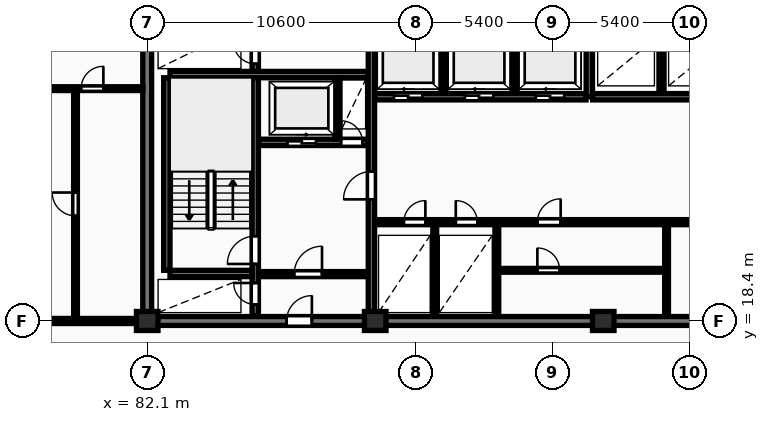
"""IFC4 building model, lengths in metres.
Left out: names, types, materials, properties, quantities, classifications, styles, units other than length and angle.
Written with IfcOpenShell. Run it as: python <this file> out.ifc"""

import sys

from ifc_helpers import new_model, si_unit, direction, frame, frame_2d, origin, origin_2d, place, context, subcontext, project, spatial, rectangle, extrude, element, fill, save


model = new_model("IFC4")
c1 = context("Model", 3, precision=1e-05, world=origin(), true_north=direction((0.0, 1.0)))
c2 = subcontext(c1, "Body", "Model", "MODEL_VIEW")
j1 = project(units=[si_unit("LENGTHUNIT", "METRE"), si_unit("PLANEANGLEUNIT", "RADIAN")], contexts=[c1])
p1 = place(None, origin())
s1 = spatial("IfcSite", under=j1, at=p1, CompositionType="ELEMENT")
p2 = place(p1, origin())
s2 = spatial("IfcBuilding", under=s1, at=p2, CompositionType="ELEMENT")
p3 = place(p2, frame((0.0, 0.0, 80.8)))
s3 = spatial("IfcBuildingStorey", under=s2, at=p3, CompositionType="ELEMENT", Elevation=80.8)
for number, where, z_axis, x_axis in (
    (1, (82.1, 18.4, 0.0), (0.0, 0.0, 1.0), (1.0, 0.0, 0.0)),
    (2, (91.1, 18.4, 0.0), (0.0, 0.0, 1.0), (1.0, 0.0, 0.0)),
    (3, (100.1, 18.4, 0.0), (0.0, 0.0, 1.0), (1.0, 0.0, 0.0)),
):
    element("IfcColumn", number, at=place(p3, frame(where, z_axis=z_axis, x_axis=x_axis)), inside=s3, PredefinedType="COLUMN", context=c2, shape_type="SweptSolid", body=[
        extrude(rectangle(XDim=0.85, YDim=0.75, at=origin_2d()), origin(), (0.0, 0.0, 1.0), 3.25),
    ])
p4 = place(p3, frame((82.1, 18.575, 0.0), z_axis=(0.0, 0.0, 1.0), x_axis=(0.0, 1.0, 0.0)))
e4 = element("IfcWall", 4, at=p4, inside=s3, PredefinedType="SHEAR", context=c2, shape_type="SweptSolid", body=[
    extrude(rectangle(XDim=11.65, YDim=0.35, at=frame_2d((5.825, 0.0))), origin(), (0.0, 0.0, 1.0), 3.25),
])
p5 = place(p3, frame((81.925, 18.4, 0.0), z_axis=(0.0, 0.0, 1.0), x_axis=(1.0, 0.0, 0.0)))
e5 = element("IfcWall", 5, at=p5, inside=s3, PredefinedType="SHEAR", context=c2, shape_type="SweptSolid", body=[
    extrude(rectangle(XDim=36.265, YDim=0.35, at=frame_2d((18.132, 0.0))), origin(), (0.0, 0.0, 1.0), 3.25),
])
p6 = place(p5, frame((5.675, 0.0, 0.0)))
e6 = element("IfcOpeningElement", 6, at=p6, cuts=e5, PredefinedType="OPENING", context=c2, shape_type="SweptSolid", body=[
    extrude(rectangle(XDim=1.0, YDim=2.15, at=frame_2d((0.5, 1.075))), frame((0.0, 0.185, 0.0), z_axis=(0.0, -1.0, 0.0), x_axis=(1.0, 0.0, 0.0)), (0.0, 0.0, 1.0), 0.37),
])
p7 = place(p5, frame((21.925, 0.0, 0.0)))
e7 = element("IfcOpeningElement", 7, at=p7, cuts=e5, PredefinedType="OPENING", context=c2, shape_type="SweptSolid", body=[
    extrude(rectangle(XDim=1.5, YDim=2.2, at=frame_2d((0.75, 1.1))), frame((0.0, 0.185, 0.0), z_axis=(0.0, -1.0, 0.0), x_axis=(1.0, 0.0, 0.0)), (0.0, 0.0, 1.0), 0.37),
])
p8 = place(p5, frame((29.875, 0.0, 0.0)))
e8 = element("IfcOpeningElement", 8, at=p8, cuts=e5, PredefinedType="OPENING", context=c2, shape_type="SweptSolid", body=[
    extrude(rectangle(XDim=1.0, YDim=2.15, at=frame_2d((0.5, 1.075))), frame((0.0, 0.185, 0.0), z_axis=(0.0, -1.0, 0.0), x_axis=(1.0, 0.0, 0.0)), (0.0, 0.0, 1.0), 0.37),
])
p9 = place(p3, frame((82.875, 20.4, 0.0), z_axis=(0.0, 0.0, 1.0), x_axis=(0.0, 1.0, 0.0)))
e9 = element("IfcWall", 9, at=p9, inside=s3, PredefinedType="SHEAR", context=c2, shape_type="SweptSolid", body=[
    extrude(rectangle(XDim=7.6, YDim=0.25, at=frame_2d((3.8, 0.0))), origin(), (0.0, 0.0, 1.0), 3.25),
])
p10 = place(p3, frame((86.365, 18.6, 0.0), z_axis=(0.0, 0.0, 1.0), x_axis=(0.0, 1.0, 0.0)))
e10 = element("IfcWall", 10, at=p10, inside=s3, PredefinedType="SHEAR", context=c2, shape_type="SweptSolid", body=[
    extrude(rectangle(XDim=11.6, YDim=0.25, at=frame_2d((5.8, 0.0))), origin(), (0.0, 0.0, 1.0), 3.25),
])
p11 = place(p10, frame((0.45, 0.0, 0.0)))
e11 = element("IfcOpeningElement", 11, at=p11, cuts=e10, PredefinedType="OPENING", context=c2, shape_type="SweptSolid", body=[
    extrude(rectangle(XDim=0.85, YDim=2.05, at=frame_2d((0.425, 1.025))), frame((0.0, 0.135, 0.0), z_axis=(0.0, -1.0, 0.0), x_axis=(1.0, 0.0, 0.0)), (0.0, 0.0, 1.0), 0.27),
])
p12 = place(p10, frame((2.05, 0.0, 0.0)))
e12 = element("IfcOpeningElement", 12, at=p12, cuts=e10, PredefinedType="OPENING", context=c2, shape_type="SweptSolid", body=[
    extrude(rectangle(XDim=1.1, YDim=2.1, at=frame_2d((0.55, 1.05))), frame((0.0, 0.135, 0.0), z_axis=(0.0, -1.0, 0.0), x_axis=(1.0, 0.0, 0.0)), (0.0, 0.0, 1.0), 0.27),
])
p13 = place(p10, frame((9.95, 0.0, 0.0)))
e13 = element("IfcOpeningElement", 13, at=p13, cuts=e10, PredefinedType="OPENING", context=c2, shape_type="SweptSolid", body=[
    extrude(rectangle(XDim=0.85, YDim=2.05, at=frame_2d((0.425, 1.025))), frame((0.0, 0.135, 0.0), z_axis=(0.0, -1.0, 0.0), x_axis=(1.0, 0.0, 0.0)), (0.0, 0.0, 1.0), 0.27),
])
p14 = place(p3, frame((83.0, 20.275, 0.0), z_axis=(0.0, 0.0, 1.0), x_axis=(1.0, 0.0, 0.0)))
e14 = element("IfcWall", 14, at=p14, inside=s3, PredefinedType="SHEAR", context=c2, shape_type="SweptSolid", body=[
    extrude(rectangle(XDim=3.24, YDim=0.25, at=frame_2d((1.62, 0.0))), origin(), (0.0, 0.0, 1.0), 3.25),
])
p15 = place(p3, frame((83.0, 28.125, 0.0), z_axis=(0.0, 0.0, 1.0), x_axis=(1.0, 0.0, 0.0)))
e15 = element("IfcWall", 15, at=p15, inside=s3, PredefinedType="SHEAR", context=c2, shape_type="SweptSolid", body=[
    extrude(rectangle(XDim=7.82, YDim=0.25, at=frame_2d((3.91, 0.0))), origin(), (0.0, 0.0, 1.0), 3.25),
])
p16 = place(p3, frame((86.5, 25.45, 0.0), z_axis=(0.0, 0.0, 1.0), x_axis=(1.0, 0.0, 0.0)))
e16 = element("IfcWall", 16, at=p16, inside=s3, PredefinedType="SHEAR", context=c2, shape_type="SweptSolid", body=[
    extrude(rectangle(XDim=4.32, YDim=0.25, at=frame_2d((2.16, 0.0))), origin(), (0.0, 0.0, 1.0), 3.25),
])
p17 = place(p16, frame((1.14, 0.0, 0.0)))
e17 = element("IfcOpeningElement", 17, at=p17, cuts=e16, PredefinedType="OPENING", context=c2, shape_type="SweptSolid", body=[
    extrude(rectangle(XDim=1.12, YDim=2.12, at=frame_2d((0.56, 1.06))), frame((0.0, 0.135, 0.0), z_axis=(0.0, -1.0, 0.0), x_axis=(1.0, 0.0, 0.0)), (0.0, 0.0, 1.0), 0.27),
])
p18 = place(p16, frame((3.25, 0.0, 0.0)))
e18 = element("IfcOpeningElement", 18, at=p18, cuts=e16, PredefinedType="OPENING", context=c2, shape_type="SweptSolid", body=[
    extrude(rectangle(XDim=0.85, YDim=2.05, at=frame_2d((0.425, 1.025))), frame((0.0, 0.135, 0.0), z_axis=(0.0, -1.0, 0.0), x_axis=(1.0, 0.0, 0.0)), (0.0, 0.0, 1.0), 0.27),
])
p19 = place(p3, frame((89.6, 25.58, 0.0), z_axis=(0.0, 0.0, 1.0), x_axis=(0.0, 1.0, 0.0)))
e19 = element("IfcWall", 19, at=p19, inside=s3, PredefinedType="PARTITIONING", context=c2, shape_type="SweptSolid", body=[
    extrude(rectangle(XDim=2.42, YDim=0.2, at=frame_2d((1.21, 0.0))), origin(), (0.0, 0.0, 1.0), 2.97),
])
p20 = place(p3, frame((86.5, 20.25, 0.0), z_axis=(0.0, 0.0, 1.0), x_axis=(1.0, 0.0, 0.0)))
e20 = element("IfcWall", 20, at=p20, inside=s3, PredefinedType="PARTITIONING", context=c2, shape_type="SweptSolid", body=[
    extrude(rectangle(XDim=4.32, YDim=0.2, at=frame_2d((2.16, 0.0))), origin(), (0.0, 0.0, 1.0), 2.97),
])
p21 = place(p20, frame((1.4, 0.0, 0.0)))
e21 = element("IfcOpeningElement", 21, at=p21, cuts=e20, PredefinedType="OPENING", context=c2, shape_type="SweptSolid", body=[
    extrude(rectangle(XDim=1.1, YDim=2.1, at=frame_2d((0.55, 1.05))), frame((0.0, 0.11, 0.0), z_axis=(0.0, -1.0, 0.0), x_axis=(1.0, 0.0, 0.0)), (0.0, 0.0, 1.0), 0.22),
])
p22 = place(p3, frame((90.95, 18.6, 0.0), z_axis=(0.0, 0.0, 1.0), x_axis=(0.0, 1.0, 0.0)))
e22 = element("IfcWall", 22, at=p22, inside=s3, PredefinedType="SHEAR", context=c2, shape_type="SweptSolid", body=[
    extrude(rectangle(XDim=11.6, YDim=0.25, at=frame_2d((5.8, 0.0))), origin(), (0.0, 0.0, 1.0), 3.25),
])
p23 = place(p22, frame((4.6, 0.0, 0.0)))
e23 = element("IfcOpeningElement", 23, at=p23, cuts=e22, PredefinedType="OPENING", context=c2, shape_type="SweptSolid", body=[
    extrude(rectangle(XDim=1.1, YDim=2.1, at=frame_2d((0.55, 1.05))), frame((0.0, 0.135, 0.0), z_axis=(0.0, -1.0, 0.0), x_axis=(1.0, 0.0, 0.0)), (0.0, 0.0, 1.0), 0.27),
])
for number, where, z_axis, x_axis in (
    (24, (93.8, 27.38, 0.0), (0.0, 0.0, 1.0), (0.0, 1.0, 0.0)),
    (25, (96.6, 27.38, 0.0), (0.0, 0.0, 1.0), (0.0, 1.0, 0.0)),
):
    element("IfcWall", number, at=place(p3, frame(where, z_axis=z_axis, x_axis=x_axis)), inside=s3, PredefinedType="PARTITIONING", context=c2, shape_type="SweptSolid", body=[
        extrude(rectangle(XDim=2.82, YDim=0.2, at=frame_2d((1.41, 0.0))), origin(), (0.0, 0.0, 1.0), 2.97),
    ])
p24 = place(p3, frame((91.08, 27.25, 0.0), z_axis=(0.0, 0.0, 1.0), x_axis=(1.0, 0.0, 0.0)))
e26 = element("IfcWall", 26, at=p24, inside=s3, PredefinedType="SHEAR", context=c2, shape_type="SweptSolid", body=[
    extrude(rectangle(XDim=8.34, YDim=0.25, at=frame_2d((4.17, 0.0))), origin(), (0.0, 0.0, 1.0), 3.25),
])
p25 = place(p24, frame((0.76, 0.0, 0.0)))
e27 = element("IfcOpeningElement", 27, at=p25, cuts=e26, PredefinedType="OPENING", context=c2, shape_type="SweptSolid", body=[
    extrude(rectangle(XDim=1.12, YDim=2.12, at=frame_2d((0.56, 1.06))), frame((0.0, 0.135, 0.0), z_axis=(0.0, -1.0, 0.0), x_axis=(1.0, 0.0, 0.0)), (0.0, 0.0, 1.0), 0.27),
])
p26 = place(p24, frame((3.56, 0.0, 0.0)))
e28 = element("IfcOpeningElement", 28, at=p26, cuts=e26, PredefinedType="OPENING", context=c2, shape_type="SweptSolid", body=[
    extrude(rectangle(XDim=1.12, YDim=2.12, at=frame_2d((0.56, 1.06))), frame((0.0, 0.135, 0.0), z_axis=(0.0, -1.0, 0.0), x_axis=(1.0, 0.0, 0.0)), (0.0, 0.0, 1.0), 0.27),
])
p27 = place(p24, frame((6.36, 0.0, 0.0)))
e29 = element("IfcOpeningElement", 29, at=p27, cuts=e26, PredefinedType="OPENING", context=c2, shape_type="SweptSolid", body=[
    extrude(rectangle(XDim=1.12, YDim=2.12, at=frame_2d((0.56, 1.06))), frame((0.0, 0.135, 0.0), z_axis=(0.0, -1.0, 0.0), x_axis=(1.0, 0.0, 0.0)), (0.0, 0.0, 1.0), 0.27),
])
p28 = place(p3, frame((99.55, 27.25, 0.0), z_axis=(0.0, 0.0, 1.0), x_axis=(0.0, 1.0, 0.0)))
e30 = element("IfcWall", 30, at=p28, inside=s3, PredefinedType="SHEAR", context=c2, shape_type="SweptSolid", body=[
    extrude(rectangle(XDim=2.95, YDim=0.25, at=frame_2d((1.475, 0.0))), origin(), (0.0, 0.0, 1.0), 3.25),
])
p29 = place(p3, frame((102.4, 27.38, 0.0), z_axis=(0.0, 0.0, 1.0), x_axis=(0.0, 1.0, 0.0)))
e31 = element("IfcWall", 31, at=p29, inside=s3, PredefinedType="PARTITIONING", context=c2, shape_type="SweptSolid", body=[
    extrude(rectangle(XDim=2.82, YDim=0.2, at=frame_2d((1.41, 0.0))), origin(), (0.0, 0.0, 1.0), 2.97),
])
p30 = place(p3, frame((99.68, 27.25, 0.0), z_axis=(0.0, 0.0, 1.0), x_axis=(1.0, 0.0, 0.0)))
e32 = element("IfcWall", 32, at=p30, inside=s3, PredefinedType="SHEAR", context=c2, shape_type="SweptSolid", body=[
    extrude(rectangle(XDim=10.54, YDim=0.25, at=frame_2d((5.27, 0.0))), origin(), (0.0, 0.0, 1.0), 3.25),
])
p31 = place(p30, frame((8.92, 0.0, 0.0)))
e33 = element("IfcOpeningElement", 33, at=p31, cuts=e32, PredefinedType="OPENING", context=c2, shape_type="SweptSolid", body=[
    extrude(rectangle(XDim=0.85, YDim=2.05, at=frame_2d((0.425, 1.025))), frame((0.0, 0.135, 0.0), z_axis=(0.0, -1.0, 0.0), x_axis=(1.0, 0.0, 0.0)), (0.0, 0.0, 1.0), 0.27),
])
for number, where, z_axis, x_axis in (
    (34, (93.45, 18.6, 0.0), (0.0, 0.0, 1.0), (0.0, 1.0, 0.0)),
    (35, (95.9, 18.6, 0.0), (0.0, 0.0, 1.0), (0.0, 1.0, 0.0)),
):
    element("IfcWall", number, at=place(p3, frame(where, z_axis=z_axis, x_axis=x_axis)), inside=s3, PredefinedType="PARTITIONING", context=c2, shape_type="SweptSolid", body=[
        extrude(rectangle(XDim=3.6, YDim=0.15, at=frame_2d((1.8, 0.0))), origin(), (0.0, 0.0, 1.0), 2.97),
    ])
p32 = place(p3, frame((95.9, 20.4, 0.0), z_axis=(0.0, 0.0, 1.0), x_axis=(1.0, 0.0, 0.0)))
e36 = element("IfcWall", 36, at=p32, inside=s3, PredefinedType="PARTITIONING", context=c2, shape_type="SweptSolid", body=[
    extrude(rectangle(XDim=6.7, YDim=0.15, at=frame_2d((3.35, 0.0))), origin(), (0.0, 0.0, 1.0), 2.97),
])
p33 = place(p32, frame((1.6, 0.0, 0.0)))
e37 = element("IfcOpeningElement", 37, at=p33, cuts=e36, PredefinedType="OPENING", context=c2, shape_type="SweptSolid", body=[
    extrude(rectangle(XDim=0.88, YDim=2.06, at=frame_2d((0.44, 1.03))), frame((0.0, 0.085, 0.0), z_axis=(0.0, -1.0, 0.0), x_axis=(1.0, 0.0, 0.0)), (0.0, 0.0, 1.0), 0.17),
])
p34 = place(p3, frame((102.6, 18.6, 0.0), z_axis=(0.0, 0.0, 1.0), x_axis=(0.0, 1.0, 0.0)))
e38 = element("IfcWall", 38, at=p34, inside=s3, PredefinedType="PARTITIONING", context=c2, shape_type="SweptSolid", body=[
    extrude(rectangle(XDim=3.6, YDim=0.15, at=frame_2d((1.8, 0.0))), origin(), (0.0, 0.0, 1.0), 2.97),
])
p35 = place(p3, frame((91.08, 22.3, 0.0), z_axis=(0.0, 0.0, 1.0), x_axis=(1.0, 0.0, 0.0)))
e39 = element("IfcWall", 39, at=p35, inside=s3, PredefinedType="PARTITIONING", context=c2, shape_type="SweptSolid", body=[
    extrude(rectangle(XDim=19.14, YDim=0.2, at=frame_2d((9.57, 0.0))), origin(), (0.0, 0.0, 1.0), 2.97),
])
p36 = place(p35, frame((1.15, 0.0, 0.0)))
e40 = element("IfcOpeningElement", 40, at=p36, cuts=e39, PredefinedType="OPENING", context=c2, shape_type="SweptSolid", body=[
    extrude(rectangle(XDim=0.85, YDim=2.05, at=frame_2d((0.425, 1.025))), frame((0.0, 0.11, 0.0), z_axis=(0.0, -1.0, 0.0), x_axis=(1.0, 0.0, 0.0)), (0.0, 0.0, 1.0), 0.22),
])
p37 = place(p35, frame((3.2, 0.0, 0.0)))
e41 = element("IfcOpeningElement", 41, at=p37, cuts=e39, PredefinedType="OPENING", context=c2, shape_type="SweptSolid", body=[
    extrude(rectangle(XDim=0.85, YDim=2.05, at=frame_2d((0.425, 1.025))), frame((0.0, 0.11, 0.0), z_axis=(0.0, -1.0, 0.0), x_axis=(1.0, 0.0, 0.0)), (0.0, 0.0, 1.0), 0.22),
])
p38 = place(p35, frame((12.72, 0.0, 0.0)))
e42 = element("IfcOpeningElement", 42, at=p38, cuts=e39, PredefinedType="OPENING", context=c2, shape_type="SweptSolid", body=[
    extrude(rectangle(XDim=1.5, YDim=2.2, at=frame_2d((0.75, 1.1))), frame((0.0, 0.11, 0.0), z_axis=(0.0, -1.0, 0.0), x_axis=(1.0, 0.0, 0.0)), (0.0, 0.0, 1.0), 0.22),
])
p39 = place(p35, frame((6.42, 0.0, 0.0)))
e43 = element("IfcOpeningElement", 43, at=p39, cuts=e39, PredefinedType="OPENING", context=c2, shape_type="SweptSolid", body=[
    extrude(rectangle(XDim=0.92, YDim=2.08, at=frame_2d((0.46, 1.04))), frame((0.0, 0.11, 0.0), z_axis=(0.0, -1.0, 0.0), x_axis=(1.0, 0.0, 0.0)), (0.0, 0.0, 1.0), 0.22),
])
p40 = place(p35, frame((15.92, 0.0, 0.0)))
e44 = element("IfcOpeningElement", 44, at=p40, cuts=e39, PredefinedType="OPENING", context=c2, shape_type="SweptSolid", body=[
    extrude(rectangle(XDim=0.88, YDim=2.06, at=frame_2d((0.44, 1.03))), frame((0.0, 0.11, 0.0), z_axis=(0.0, -1.0, 0.0), x_axis=(1.0, 0.0, 0.0)), (0.0, 0.0, 1.0), 0.22),
])
p41 = place(p3, frame((79.27, 18.45, 0.0), z_axis=(0.0, 0.0, 1.0), x_axis=(0.0, 1.0, 0.0)))
e45 = element("IfcWall", 45, at=p41, inside=s3, PredefinedType="PARTITIONING", context=c2, shape_type="SweptSolid", body=[
    extrude(rectangle(XDim=9.12, YDim=0.15, at=frame_2d((4.56, 0.0))), origin(), (0.0, 0.0, 1.0), 2.97),
])
p42 = place(p41, frame((4.1, 0.0, 0.0)))
e46 = element("IfcOpeningElement", 46, at=p42, cuts=e45, PredefinedType="OPENING", context=c2, shape_type="SweptSolid", body=[
    extrude(rectangle(XDim=0.92, YDim=2.08, at=frame_2d((0.46, 1.04))), frame((0.0, 0.085, 0.0), z_axis=(0.0, -1.0, 0.0), x_axis=(1.0, 0.0, 0.0)), (0.0, 0.0, 1.0), 0.17),
])
p43 = place(p3, frame((75.17, 27.57, 0.0), z_axis=(0.0, 0.0, 1.0), x_axis=(1.0, 0.0, 0.0)))
e47 = element("IfcWall", 47, at=p43, inside=s3, PredefinedType="PARTITIONING", context=c2, shape_type="SweptSolid", body=[
    extrude(rectangle(XDim=6.76, YDim=0.15, at=frame_2d((3.38, 0.0))), origin(), (0.0, 0.0, 1.0), 2.97),
])
p44 = place(p43, frame((1.266, 0.0, 0.0)))
e48 = element("IfcOpeningElement", 48, at=p44, cuts=e47, PredefinedType="OPENING", context=c2, shape_type="SweptSolid", body=[
    extrude(rectangle(XDim=0.84, YDim=2.04, at=frame_2d((0.42, 1.02))), frame((0.0, 0.085, 0.0), z_axis=(0.0, -1.0, 0.0), x_axis=(1.0, 0.0, 0.0)), (0.0, 0.0, 1.0), 0.17),
])
p45 = place(p43, frame((4.32, 0.0, 0.0)))
e49 = element("IfcOpeningElement", 49, at=p45, cuts=e47, PredefinedType="OPENING", context=c2, shape_type="SweptSolid", body=[
    extrude(rectangle(XDim=0.88, YDim=2.06, at=frame_2d((0.44, 1.03))), frame((0.0, 0.085, 0.0), z_axis=(0.0, -1.0, 0.0), x_axis=(1.0, 0.0, 0.0)), (0.0, 0.0, 1.0), 0.17),
])
p46 = place(p3, frame((72.7, 18.4, 0.0), z_axis=(0.0, 0.0, 1.0), x_axis=(1.0, 0.0, 0.0)))
e50 = element("IfcWall", 50, at=p46, inside=s3, PredefinedType="PARTITIONING", context=c2, shape_type="SweptSolid", body=[
    extrude(rectangle(XDim=9.25, YDim=0.2, at=frame_2d((4.625, 0.0))), origin(), (0.0, 0.0, 1.0), 2.358),
])
p47 = place(p46, frame((4.15, 0.0, 0.0)))
e51 = element("IfcOpeningElement", 51, at=p47, cuts=e50, PredefinedType="OPENING", context=c2, shape_type="SweptSolid", body=[
    extrude(rectangle(XDim=0.95, YDim=2.15, at=frame_2d((0.475, 1.075))), frame((0.0, 0.11, 0.0), z_axis=(0.0, -1.0, 0.0), x_axis=(1.0, 0.0, 0.0)), (0.0, 0.0, 1.0), 0.22),
])
p48 = place(p6, origin())
e52 = element("IfcDoor", 52, at=p48, inside=s3, OperationType="SINGLE_SWING_RIGHT", PredefinedType="DOOR", context=c2, shape_type="SweptSolid", body=[
    extrude(rectangle(XDim=1.0, YDim=2.15, at=frame_2d((0.5, 1.075))), frame((0.0, 0.025, 0.0), z_axis=(0.0, -1.0, 0.0), x_axis=(1.0, 0.0, 0.0)), (0.0, 0.0, 1.0), 0.05),
])
fill(e6, e52)
p49 = place(p11, origin())
e53 = element("IfcDoor", 53, at=p49, inside=s3, OperationType="SINGLE_SWING_RIGHT", PredefinedType="DOOR", context=c2, shape_type="SweptSolid", body=[
    extrude(rectangle(XDim=0.85, YDim=2.05, at=frame_2d((0.425, 1.025))), frame((0.0, 0.025, 0.0), z_axis=(0.0, -1.0, 0.0), x_axis=(1.0, 0.0, 0.0)), (0.0, 0.0, 1.0), 0.05),
])
fill(e11, e53)
p50 = place(p12, origin())
e54 = element("IfcDoor", 54, at=p50, inside=s3, OperationType="SINGLE_SWING_LEFT", PredefinedType="DOOR", context=c2, shape_type="SweptSolid", body=[
    extrude(rectangle(XDim=1.1, YDim=2.1, at=frame_2d((0.55, 1.05))), frame((0.0, 0.025, 0.0), z_axis=(0.0, -1.0, 0.0), x_axis=(1.0, 0.0, 0.0)), (0.0, 0.0, 1.0), 0.05),
])
fill(e12, e54)
p51 = place(p13, origin())
e55 = element("IfcDoor", 55, at=p51, inside=s3, OperationType="SINGLE_SWING_RIGHT", PredefinedType="DOOR", context=c2, shape_type="SweptSolid", body=[
    extrude(rectangle(XDim=0.85, YDim=2.05, at=frame_2d((0.425, 1.025))), frame((0.0, 0.025, 0.0), z_axis=(0.0, -1.0, 0.0), x_axis=(1.0, 0.0, 0.0)), (0.0, 0.0, 1.0), 0.05),
])
fill(e13, e55)
p52 = place(p17, origin())
e56 = element("IfcDoor", 56, at=p52, inside=s3, OperationType="SLIDING_TO_RIGHT", PredefinedType="DOOR", context=c2, shape_type="SweptSolid", body=[
    extrude(rectangle(XDim=1.12, YDim=2.12, at=frame_2d((0.56, 1.06))), frame((0.0, 0.025, 0.0), z_axis=(0.0, -1.0, 0.0), x_axis=(1.0, 0.0, 0.0)), (0.0, 0.0, 1.0), 0.05),
])
fill(e17, e56)
p53 = place(p18, origin())
e57 = element("IfcDoor", 57, at=p53, inside=s3, OperationType="SINGLE_SWING_LEFT", PredefinedType="DOOR", context=c2, shape_type="SweptSolid", body=[
    extrude(rectangle(XDim=0.85, YDim=2.05, at=frame_2d((0.425, 1.025))), frame((0.0, 0.025, 0.0), z_axis=(0.0, -1.0, 0.0), x_axis=(1.0, 0.0, 0.0)), (0.0, 0.0, 1.0), 0.05),
])
fill(e18, e57)
p54 = place(p21, origin())
e58 = element("IfcDoor", 58, at=p54, inside=s3, OperationType="SINGLE_SWING_RIGHT", PredefinedType="DOOR", context=c2, shape_type="SweptSolid", body=[
    extrude(rectangle(XDim=1.1, YDim=2.1, at=frame_2d((0.55, 1.05))), frame((0.0, 0.025, 0.0), z_axis=(0.0, -1.0, 0.0), x_axis=(1.0, 0.0, 0.0)), (0.0, 0.0, 1.0), 0.05),
])
fill(e21, e58)
p55 = place(p23, origin())
e59 = element("IfcDoor", 59, at=p55, inside=s3, OperationType="SINGLE_SWING_LEFT", PredefinedType="DOOR", context=c2, shape_type="SweptSolid", body=[
    extrude(rectangle(XDim=1.1, YDim=2.1, at=frame_2d((0.55, 1.05))), frame((0.0, 0.025, 0.0), z_axis=(0.0, -1.0, 0.0), x_axis=(1.0, 0.0, 0.0)), (0.0, 0.0, 1.0), 0.05),
])
fill(e23, e59)
p56 = place(p25, origin())
e60 = element("IfcDoor", 60, at=p56, inside=s3, OperationType="SLIDING_TO_LEFT", PredefinedType="DOOR", context=c2, shape_type="SweptSolid", body=[
    extrude(rectangle(XDim=1.12, YDim=2.12, at=frame_2d((0.56, 1.06))), frame((0.0, 0.025, 0.0), z_axis=(0.0, -1.0, 0.0), x_axis=(1.0, 0.0, 0.0)), (0.0, 0.0, 1.0), 0.05),
])
fill(e27, e60)
p57 = place(p26, origin())
e61 = element("IfcDoor", 61, at=p57, inside=s3, OperationType="SLIDING_TO_LEFT", PredefinedType="DOOR", context=c2, shape_type="SweptSolid", body=[
    extrude(rectangle(XDim=1.12, YDim=2.12, at=frame_2d((0.56, 1.06))), frame((0.0, 0.025, 0.0), z_axis=(0.0, -1.0, 0.0), x_axis=(1.0, 0.0, 0.0)), (0.0, 0.0, 1.0), 0.05),
])
fill(e28, e61)
p58 = place(p27, origin())
e62 = element("IfcDoor", 62, at=p58, inside=s3, OperationType="SLIDING_TO_LEFT", PredefinedType="DOOR", context=c2, shape_type="SweptSolid", body=[
    extrude(rectangle(XDim=1.12, YDim=2.12, at=frame_2d((0.56, 1.06))), frame((0.0, 0.025, 0.0), z_axis=(0.0, -1.0, 0.0), x_axis=(1.0, 0.0, 0.0)), (0.0, 0.0, 1.0), 0.05),
])
fill(e29, e62)
p59 = place(p33, origin())
e63 = element("IfcDoor", 63, at=p59, inside=s3, OperationType="SINGLE_SWING_LEFT", PredefinedType="DOOR", context=c2, shape_type="SweptSolid", body=[
    extrude(rectangle(XDim=0.88, YDim=2.06, at=frame_2d((0.44, 1.03))), frame((0.0, 0.025, 0.0), z_axis=(0.0, -1.0, 0.0), x_axis=(1.0, 0.0, 0.0)), (0.0, 0.0, 1.0), 0.05),
])
fill(e37, e63)
p60 = place(p36, origin())
e64 = element("IfcDoor", 64, at=p60, inside=s3, OperationType="SINGLE_SWING_RIGHT", PredefinedType="DOOR", context=c2, shape_type="SweptSolid", body=[
    extrude(rectangle(XDim=0.85, YDim=2.05, at=frame_2d((0.425, 1.025))), frame((0.0, 0.025, 0.0), z_axis=(0.0, -1.0, 0.0), x_axis=(1.0, 0.0, 0.0)), (0.0, 0.0, 1.0), 0.05),
])
fill(e40, e64)
p61 = place(p37, origin())
e65 = element("IfcDoor", 65, at=p61, inside=s3, OperationType="SINGLE_SWING_LEFT", PredefinedType="DOOR", context=c2, shape_type="SweptSolid", body=[
    extrude(rectangle(XDim=0.85, YDim=2.05, at=frame_2d((0.425, 1.025))), frame((0.0, 0.025, 0.0), z_axis=(0.0, -1.0, 0.0), x_axis=(1.0, 0.0, 0.0)), (0.0, 0.0, 1.0), 0.05),
])
fill(e41, e65)
p62 = place(p39, origin())
e66 = element("IfcDoor", 66, at=p62, inside=s3, OperationType="SINGLE_SWING_RIGHT", PredefinedType="DOOR", context=c2, shape_type="SweptSolid", body=[
    extrude(rectangle(XDim=0.92, YDim=2.08, at=frame_2d((0.46, 1.04))), frame((0.0, 0.025, 0.0), z_axis=(0.0, -1.0, 0.0), x_axis=(1.0, 0.0, 0.0)), (0.0, 0.0, 1.0), 0.05),
])
fill(e43, e66)
p63 = place(p42, origin())
e67 = element("IfcDoor", 67, at=p63, inside=s3, OperationType="SINGLE_SWING_RIGHT", PredefinedType="DOOR", context=c2, shape_type="SweptSolid", body=[
    extrude(rectangle(XDim=0.92, YDim=2.08, at=frame_2d((0.46, 1.04))), frame((0.0, 0.025, 0.0), z_axis=(0.0, -1.0, 0.0), x_axis=(1.0, 0.0, 0.0)), (0.0, 0.0, 1.0), 0.05),
])
fill(e46, e67)
p64 = place(p45, origin())
e68 = element("IfcDoor", 68, at=p64, inside=s3, OperationType="SINGLE_SWING_RIGHT", PredefinedType="DOOR", context=c2, shape_type="SweptSolid", body=[
    extrude(rectangle(XDim=0.88, YDim=2.06, at=frame_2d((0.44, 1.03))), frame((0.0, 0.025, 0.0), z_axis=(0.0, -1.0, 0.0), x_axis=(1.0, 0.0, 0.0)), (0.0, 0.0, 1.0), 0.05),
])
fill(e49, e68)
save(model, sys.argv[1])
